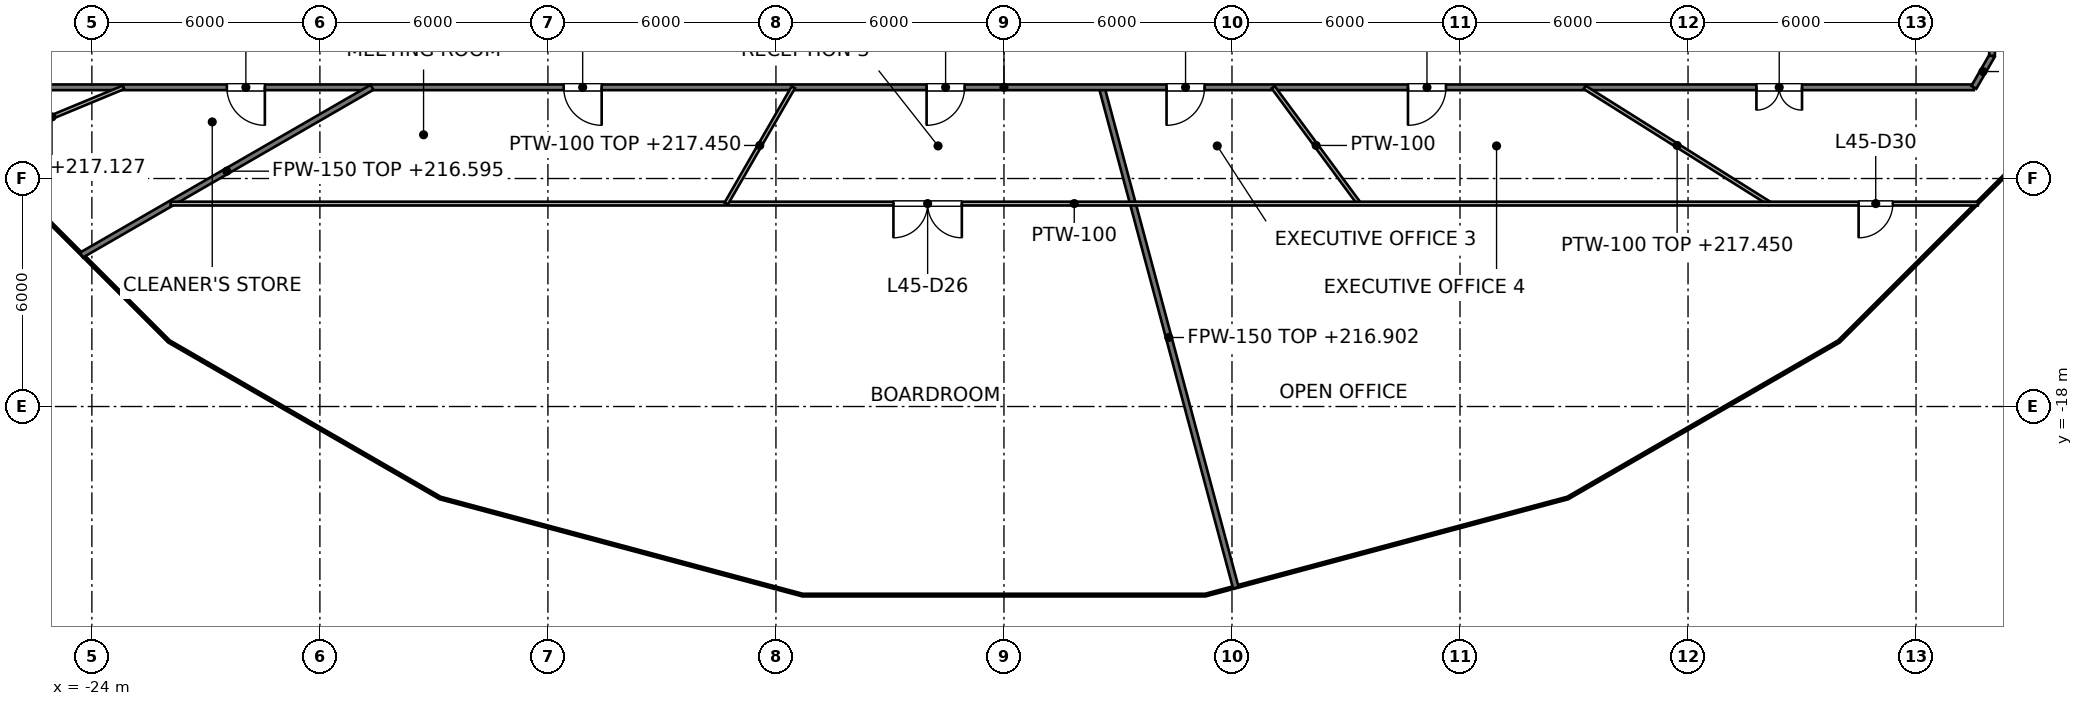
"""IFC4 building model, lengths in metres.
Left out: names, types, materials, properties, quantities, classifications, styles, units other than length and angle.
Written with IfcOpenShell. Run it as: python <this file> out.ifc"""

import sys

from ifc_helpers import new_model, si_unit, direction, frame, frame_2d, origin, place, context, subcontext, project, spatial, rectangle, extrude, element, fill, save


model = new_model("IFC4")
c1 = context("Model", 3, precision=1e-05, world=origin(), true_north=direction((0.0, 1.0)))
c2 = subcontext(c1, "Body", "Model", "MODEL_VIEW")
j1 = project(units=[si_unit("LENGTHUNIT", "METRE"), si_unit("PLANEANGLEUNIT", "RADIAN")], contexts=[c1])
p1 = place(None, origin())
s1 = spatial("IfcSite", under=j1, at=p1, CompositionType="ELEMENT")
p2 = place(p1, origin())
s2 = spatial("IfcBuilding", under=s1, at=p2, CompositionType="ELEMENT")
p3 = place(p2, frame((0.0, 0.0, 213.6)))
s3 = spatial("IfcBuildingStorey", under=s2, at=p3, CompositionType="ELEMENT", Elevation=213.6)
p4 = place(p3, frame((2.572, -9.6, 0.0), z_axis=(0.0, 0.0, 1.0), x_axis=(0.258850664236, -0.965917353413, 0.0)))
e1 = element("IfcWall", 1, at=p4, inside=s3, PredefinedType="PARTITIONING", context=c2, shape_type="SweptSolid", body=[
    extrude(rectangle(XDim=13.633, YDim=0.15, at=frame_2d((6.816, 0.0))), origin(), (0.0, 0.0, 1.0), 3.302),
])
p5 = place(p3, frame((-25.521, -9.6, 0.0), z_axis=(0.0, 0.0, 1.0), x_axis=(1.0, 0.0, 0.0)))
e2 = element("IfcWall", 2, at=p5, inside=s3, PredefinedType="PARTITIONING", context=c2, shape_type="SweptSolid", body=[
    extrude(rectangle(XDim=51.042, YDim=0.15, at=frame_2d((25.521, 0.0))), origin(), (0.0, 0.0, 1.0), 2.927),
])
p6 = place(p5, frame((5.073, 0.0, 0.0)))
e3 = element("IfcOpeningElement", 3, at=p6, cuts=e2, PredefinedType="OPENING", context=c2, shape_type="SweptSolid", body=[
    extrude(rectangle(XDim=1.0, YDim=2.1, at=frame_2d((0.5, 1.05))), frame((0.0, 0.075, 0.0), z_axis=(0.0, -1.0, 0.0), x_axis=(1.0, 0.0, 0.0)), (0.0, 0.0, 1.0), 0.15),
])
p7 = place(p5, frame((13.936, 0.0, 0.0)))
e4 = element("IfcOpeningElement", 4, at=p7, cuts=e2, PredefinedType="OPENING", context=c2, shape_type="SweptSolid", body=[
    extrude(rectangle(XDim=1.0, YDim=2.1, at=frame_2d((0.5, 1.05))), frame((0.0, 0.075, 0.0), z_axis=(0.0, -1.0, 0.0), x_axis=(1.0, 0.0, 0.0)), (0.0, 0.0, 1.0), 0.15),
])
p8 = place(p5, frame((23.485, 0.0, 0.0)))
e5 = element("IfcOpeningElement", 5, at=p8, cuts=e2, PredefinedType="OPENING", context=c2, shape_type="SweptSolid", body=[
    extrude(rectangle(XDim=1.0, YDim=2.1, at=frame_2d((0.5, 1.05))), frame((0.0, 0.075, 0.0), z_axis=(0.0, -1.0, 0.0), x_axis=(1.0, 0.0, 0.0)), (0.0, 0.0, 1.0), 0.15),
])
p9 = place(p5, frame((29.799, 0.0, 0.0)))
e6 = element("IfcOpeningElement", 6, at=p9, cuts=e2, PredefinedType="OPENING", context=c2, shape_type="SweptSolid", body=[
    extrude(rectangle(XDim=1.0, YDim=2.1, at=frame_2d((0.5, 1.05))), frame((0.0, 0.075, 0.0), z_axis=(0.0, -1.0, 0.0), x_axis=(1.0, 0.0, 0.0)), (0.0, 0.0, 1.0), 0.15),
])
p10 = place(p5, frame((36.152, 0.0, 0.0)))
e7 = element("IfcOpeningElement", 7, at=p10, cuts=e2, PredefinedType="OPENING", context=c2, shape_type="SweptSolid", body=[
    extrude(rectangle(XDim=1.0, YDim=2.1, at=frame_2d((0.5, 1.05))), frame((0.0, 0.075, 0.0), z_axis=(0.0, -1.0, 0.0), x_axis=(1.0, 0.0, 0.0)), (0.0, 0.0, 1.0), 0.15),
])
p11 = place(p5, frame((45.321, 0.0, 0.0)))
e8 = element("IfcOpeningElement", 8, at=p11, cuts=e2, PredefinedType="OPENING", context=c2, shape_type="SweptSolid", body=[
    extrude(rectangle(XDim=1.2, YDim=2.1, at=frame_2d((0.6, 1.05))), frame((0.0, 0.075, 0.0), z_axis=(0.0, -1.0, 0.0), x_axis=(1.0, 0.0, 0.0)), (0.0, 0.0, 1.0), 0.15),
])
p12 = place(p3, frame((-24.273, -14.014, 0.0), z_axis=(0.0, 0.0, 1.0), x_axis=(0.866027156147, 0.499996964807, 0.0)))
e9 = element("IfcWall", 9, at=p12, inside=s3, PredefinedType="PARTITIONING", context=c2, shape_type="SweptSolid", body=[
    extrude(rectangle(XDim=8.828, YDim=0.15, at=frame_2d((4.414, 0.0))), origin(), (0.0, 0.0, 1.0), 2.995),
])
p13 = place(p3, frame((25.521, -9.6, 0.0), z_axis=(0.0, 0.0, 1.0), x_axis=(0.499950501706, 0.866053979752, 0.0)))
e10 = element("IfcWall", 10, at=p13, inside=s3, PredefinedType="PARTITIONING", context=c2, shape_type="SweptSolid", body=[
    extrude(rectangle(XDim=0.958, YDim=0.15, at=frame_2d((0.479, 0.0))), origin(), (0.0, 0.0, 1.0), 3.85),
])
p14 = place(p3, frame((26.0, -8.771, 0.0), z_axis=(0.0, 0.0, 1.0), x_axis=(0.0, 1.0, 0.0)))
e11 = element("IfcWall", 11, at=p14, inside=s3, PredefinedType="PARTITIONING", context=c2, shape_type="SweptSolid", body=[
    extrude(rectangle(XDim=1.971, YDim=0.15, at=frame_2d((0.985, 0.0))), origin(), (0.0, 0.0, 1.0), 2.927),
])
p15 = place(p3, frame((7.085, -9.6, 0.0), z_axis=(0.0, 0.0, 1.0), x_axis=(0.593787976906, -0.80462154985, 0.0)))
e12 = element("IfcWall", 12, at=p15, inside=s3, PredefinedType="PARTITIONING", context=c2, shape_type="SweptSolid", body=[
    extrude(rectangle(XDim=3.803, YDim=0.1, at=frame_2d((1.901, 0.0))), origin(), (0.0, 0.0, 1.0), 2.927),
])
p16 = place(p3, frame((15.278, -9.6, 0.0), z_axis=(0.0, 0.0, 1.0), x_axis=(0.84673434941, -0.532015922252, 0.0)))
e13 = element("IfcWall", 13, at=p16, inside=s3, PredefinedType="PARTITIONING", context=c2, shape_type="SweptSolid", body=[
    extrude(rectangle(XDim=5.751, YDim=0.1, at=frame_2d((2.876, 0.0))), origin(), (0.0, 0.0, 1.0), 3.85),
])
p17 = place(p3, frame((-21.928, -12.66, 0.0), z_axis=(0.0, 0.0, 1.0), x_axis=(1.0, 0.0, 0.0)))
e14 = element("IfcWall", 14, at=p17, inside=s3, PredefinedType="PARTITIONING", context=c2, shape_type="SweptSolid", body=[
    extrude(rectangle(XDim=47.555, YDim=0.1, at=frame_2d((23.777, 0.0))), origin(), (0.0, 0.0, 1.0), 2.927),
])
p18 = place(p17, frame((19.02, 0.0, 0.0)))
e15 = element("IfcOpeningElement", 15, at=p18, cuts=e14, PredefinedType="OPENING", context=c2, shape_type="SweptSolid", body=[
    extrude(rectangle(XDim=1.8, YDim=2.1, at=frame_2d((0.9, 1.05))), frame((0.0, 0.05, 0.0), z_axis=(0.0, -1.0, 0.0), x_axis=(1.0, 0.0, 0.0)), (0.0, 0.0, 1.0), 0.1),
])
p19 = place(p17, frame((44.417, 0.0, 0.0)))
e16 = element("IfcOpeningElement", 16, at=p19, cuts=e14, PredefinedType="OPENING", context=c2, shape_type="SweptSolid", body=[
    extrude(rectangle(XDim=0.9, YDim=2.1, at=frame_2d((0.45, 1.05))), frame((0.0, 0.05, 0.0), z_axis=(0.0, -1.0, 0.0), x_axis=(1.0, 0.0, 0.0)), (0.0, 0.0, 1.0), 0.1),
])
p20 = place(p3, frame((-26.93, -11.159, 0.0), z_axis=(0.0, 0.0, 1.0), x_axis=(0.923864138535, 0.382720594598, 0.0)))
e17 = element("IfcWall", 17, at=p20, inside=s3, PredefinedType="PARTITIONING", context=c2, shape_type="SweptSolid", body=[
    extrude(rectangle(XDim=4.073, YDim=0.1, at=frame_2d((2.037, 0.0))), origin(), (0.0, 0.0, 1.0), 3.527),
])
p21 = place(p3, frame((-7.309, -12.66, 0.0), z_axis=(0.0, 0.0, 1.0), x_axis=(0.499899920428, 0.866083177042, 0.0)))
e18 = element("IfcWall", 18, at=p21, inside=s3, PredefinedType="PARTITIONING", context=c2, shape_type="SweptSolid", body=[
    extrude(rectangle(XDim=3.533, YDim=0.1, at=frame_2d((1.767, 0.0))), origin(), (0.0, 0.0, 1.0), 3.85),
])
p22 = place(p6, origin())
e19 = element("IfcDoor", 19, at=p22, inside=s3, OperationType="SINGLE_SWING_RIGHT", PredefinedType="DOOR", context=c2, shape_type="SweptSolid", body=[
    extrude(rectangle(XDim=1.0, YDim=2.1, at=frame_2d((0.5, 1.05))), frame((0.0, 0.025, 0.0), z_axis=(0.0, -1.0, 0.0), x_axis=(1.0, 0.0, 0.0)), (0.0, 0.0, 1.0), 0.05),
])
fill(e3, e19)
p23 = place(p7, origin())
e20 = element("IfcDoor", 20, at=p23, inside=s3, OperationType="SINGLE_SWING_RIGHT", PredefinedType="DOOR", context=c2, shape_type="SweptSolid", body=[
    extrude(rectangle(XDim=1.0, YDim=2.1, at=frame_2d((0.5, 1.05))), frame((0.0, 0.025, 0.0), z_axis=(0.0, -1.0, 0.0), x_axis=(1.0, 0.0, 0.0)), (0.0, 0.0, 1.0), 0.05),
])
fill(e4, e20)
p24 = place(p8, origin())
e21 = element("IfcDoor", 21, at=p24, inside=s3, OperationType="SINGLE_SWING_LEFT", PredefinedType="DOOR", context=c2, shape_type="SweptSolid", body=[
    extrude(rectangle(XDim=1.0, YDim=2.1, at=frame_2d((0.5, 1.05))), frame((0.0, 0.025, 0.0), z_axis=(0.0, -1.0, 0.0), x_axis=(1.0, 0.0, 0.0)), (0.0, 0.0, 1.0), 0.05),
])
fill(e5, e21)
p25 = place(p18, origin())
e22 = element("IfcDoor", 22, at=p25, inside=s3, OperationType="DOUBLE_DOOR_SINGLE_SWING", PredefinedType="DOOR", context=c2, shape_type="SweptSolid", body=[
    extrude(rectangle(XDim=1.8, YDim=2.1, at=frame_2d((0.9, 1.05))), frame((0.0, 0.025, 0.0), z_axis=(0.0, -1.0, 0.0), x_axis=(1.0, 0.0, 0.0)), (0.0, 0.0, 1.0), 0.05),
])
fill(e15, e22)
p26 = place(p9, origin())
e23 = element("IfcDoor", 23, at=p26, inside=s3, OperationType="SINGLE_SWING_LEFT", PredefinedType="DOOR", context=c2, shape_type="SweptSolid", body=[
    extrude(rectangle(XDim=1.0, YDim=2.1, at=frame_2d((0.5, 1.05))), frame((0.0, 0.025, 0.0), z_axis=(0.0, -1.0, 0.0), x_axis=(1.0, 0.0, 0.0)), (0.0, 0.0, 1.0), 0.05),
])
fill(e6, e23)
p27 = place(p10, origin())
e24 = element("IfcDoor", 24, at=p27, inside=s3, OperationType="SINGLE_SWING_LEFT", PredefinedType="DOOR", context=c2, shape_type="SweptSolid", body=[
    extrude(rectangle(XDim=1.0, YDim=2.1, at=frame_2d((0.5, 1.05))), frame((0.0, 0.025, 0.0), z_axis=(0.0, -1.0, 0.0), x_axis=(1.0, 0.0, 0.0)), (0.0, 0.0, 1.0), 0.05),
])
fill(e7, e24)
p28 = place(p11, origin())
e25 = element("IfcDoor", 25, at=p28, inside=s3, OperationType="DOUBLE_DOOR_SINGLE_SWING", PredefinedType="DOOR", context=c2, shape_type="SweptSolid", body=[
    extrude(rectangle(XDim=1.2, YDim=2.1, at=frame_2d((0.6, 1.05))), frame((0.0, 0.025, 0.0), z_axis=(0.0, -1.0, 0.0), x_axis=(1.0, 0.0, 0.0)), (0.0, 0.0, 1.0), 0.05),
])
fill(e8, e25)
p29 = place(p19, origin())
e26 = element("IfcDoor", 26, at=p29, inside=s3, OperationType="SINGLE_SWING_LEFT", PredefinedType="DOOR", context=c2, shape_type="SweptSolid", body=[
    extrude(rectangle(XDim=0.9, YDim=2.1, at=frame_2d((0.45, 1.05))), frame((0.0, 0.025, 0.0), z_axis=(0.0, -1.0, 0.0), x_axis=(1.0, 0.0, 0.0)), (0.0, 0.0, 1.0), 0.05),
])
fill(e16, e26)
save(model, sys.argv[1])
